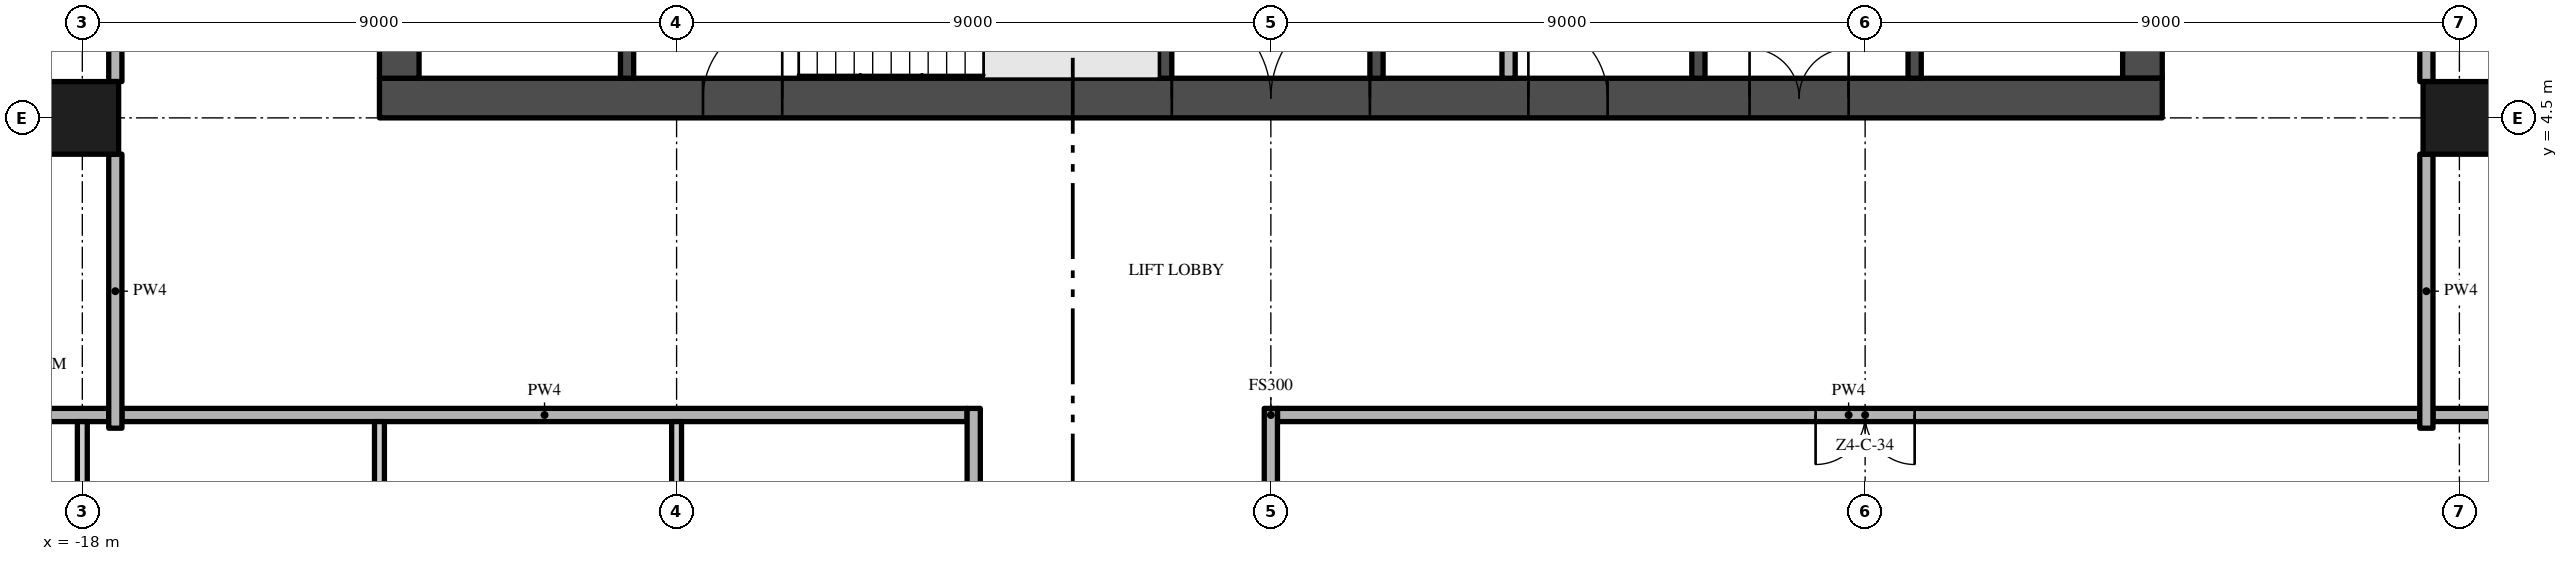
"""IFC4 building model, lengths in metres.
Left out: names, types, materials, properties, quantities, classifications, styles, units other than length and angle.
Written with IfcOpenShell. Run it as: python <this file> out.ifc"""

import sys

from ifc_helpers import new_model, si_unit, direction, frame, frame_2d, origin, origin_2d, place, context, subcontext, project, spatial, rectangle, extrude, element, fill, save


model = new_model("IFC4")
c1 = context("Model", 3, precision=1e-05, world=origin(), true_north=direction((0.0, 1.0)))
c2 = subcontext(c1, "Body", "Model", "MODEL_VIEW")
j1 = project(units=[si_unit("LENGTHUNIT", "METRE"), si_unit("PLANEANGLEUNIT", "RADIAN")], contexts=[c1])
p1 = place(None, origin())
s1 = spatial("IfcSite", under=j1, at=p1, CompositionType="ELEMENT")
p2 = place(p1, origin())
s2 = spatial("IfcBuilding", under=s1, at=p2, CompositionType="ELEMENT")
p3 = place(p2, frame((0.0, 0.0, 207.2)))
s3 = spatial("IfcBuildingStorey", under=s2, at=p3, CompositionType="ELEMENT", Elevation=207.2)
p4 = place(p3, frame((-13.5, 4.8, -0.3), z_axis=(0.0, 0.0, 1.0), x_axis=(1.0, 0.0, 0.0)))
e1 = element("IfcWall", 1, at=p4, inside=s3, PredefinedType="SHEAR", context=c2, shape_type="SweptSolid", body=[
    extrude(rectangle(XDim=27.0, YDim=0.6, at=frame_2d((13.5, 0.0))), origin(), (0.0, 0.0, 1.0), 3.8),
])
p5 = place(p4, frame((12.0, 0.0, 0.3)))
e2 = element("IfcOpeningElement", 2, at=p5, cuts=e1, PredefinedType="OPENING", context=c2, shape_type="SweptSolid", body=[
    extrude(rectangle(XDim=3.0, YDim=2.4, at=frame_2d((1.5, 1.2))), frame((0.0, 0.31, 0.0), z_axis=(0.0, -1.0, 0.0), x_axis=(1.0, 0.0, 0.0)), (0.0, 0.0, 1.0), 0.62),
])
p6 = place(p4, frame((4.9, 0.0, 0.3)))
e3 = element("IfcOpeningElement", 3, at=p6, cuts=e1, PredefinedType="OPENING", context=c2, shape_type="SweptSolid", body=[
    extrude(rectangle(XDim=1.2, YDim=2.2, at=frame_2d((0.6, 1.1))), frame((0.0, 0.31, 0.0), z_axis=(0.0, -1.0, 0.0), x_axis=(1.0, 0.0, 0.0)), (0.0, 0.0, 1.0), 0.62),
])
p7 = place(p4, frame((20.75, 0.0, 0.3)))
e4 = element("IfcOpeningElement", 4, at=p7, cuts=e1, PredefinedType="OPENING", context=c2, shape_type="SweptSolid", body=[
    extrude(rectangle(XDim=1.5, YDim=2.2, at=frame_2d((0.75, 1.1))), frame((0.0, 0.31, 0.0), z_axis=(0.0, -1.0, 0.0), x_axis=(1.0, 0.0, 0.0)), (0.0, 0.0, 1.0), 0.62),
])
p8 = place(p4, frame((17.4, 0.0, 0.3)))
e5 = element("IfcOpeningElement", 5, at=p8, cuts=e1, PredefinedType="OPENING", context=c2, shape_type="SweptSolid", body=[
    extrude(rectangle(XDim=1.2, YDim=2.2, at=frame_2d((0.6, 1.1))), frame((0.0, 0.31, 0.0), z_axis=(0.0, -1.0, 0.0), x_axis=(1.0, 0.0, 0.0)), (0.0, 0.0, 1.0), 0.62),
])
p9 = place(p3, frame((13.2, 5.1, -0.3), z_axis=(0.0, 0.0, 1.0), x_axis=(0.0, 1.0, 0.0)))
e6 = element("IfcWall", 6, at=p9, inside=s3, PredefinedType="SHEAR", context=c2, shape_type="SweptSolid", body=[
    extrude(rectangle(XDim=16.8, YDim=0.6, at=frame_2d((8.4, 0.0))), origin(), (0.0, 0.0, 1.0), 3.8),
])
p10 = place(p9, frame((6.3, 0.0, 0.3)))
e7 = element("IfcOpeningElement", 7, at=p10, cuts=e6, PredefinedType="OPENING", context=c2, shape_type="SweptSolid", body=[
    extrude(rectangle(XDim=1.2, YDim=2.2, at=frame_2d((0.6, 1.1))), frame((0.0, 0.31, 0.0), z_axis=(0.0, -1.0, 0.0), x_axis=(1.0, 0.0, 0.0)), (0.0, 0.0, 1.0), 0.62),
])
p11 = place(p3, frame((-13.2, 21.9, -0.3), z_axis=(0.0, 0.0, 1.0), x_axis=(0.0, -1.0, 0.0)))
e8 = element("IfcWall", 8, at=p11, inside=s3, PredefinedType="SHEAR", context=c2, shape_type="SweptSolid", body=[
    extrude(rectangle(XDim=16.8, YDim=0.6, at=frame_2d((8.4, 0.0))), origin(), (0.0, 0.0, 1.0), 3.8),
])
p12 = place(p11, frame((9.3, 0.0, 0.3)))
e9 = element("IfcOpeningElement", 9, at=p12, cuts=e8, PredefinedType="OPENING", context=c2, shape_type="SweptSolid", body=[
    extrude(rectangle(XDim=1.2, YDim=2.2, at=frame_2d((0.6, 1.1))), frame((0.0, 0.31, 0.0), z_axis=(0.0, -1.0, 0.0), x_axis=(1.0, 0.0, 0.0)), (0.0, 0.0, 1.0), 0.62),
])
for number, where, z_axis, x_axis in (
    (10, (-18.0, 4.5, 0.0), (0.0, 0.0, 1.0), (1.0, 0.0, 0.0)),
    (11, (18.0, 4.5, 0.0), (0.0, 0.0, 1.0), (1.0, 0.0, 0.0)),
):
    element("IfcColumn", number, at=place(p3, frame(where, z_axis=z_axis, x_axis=x_axis)), inside=s3, PredefinedType="COLUMN", context=c2, shape_type="SweptSolid", body=[
        extrude(rectangle(XDim=1.1, YDim=1.1, at=origin_2d()), origin(), (0.0, 0.0, 1.0), 3.5),
    ])
for number, where, z_axis, x_axis in (
    (12, (-9.75, 5.1, 0.0), (0.0, 0.0, 1.0), (0.0, 1.0, 0.0)),
    (13, (-1.6, 5.1, 0.0), (0.0, 0.0, 1.0), (0.0, 1.0, 0.0)),
):
    element("IfcWall", number, at=place(p3, frame(where, z_axis=z_axis, x_axis=x_axis)), inside=s3, PredefinedType="SHEAR", context=c2, shape_type="SweptSolid", body=[
        extrude(rectangle(XDim=2.85, YDim=0.2, at=frame_2d((1.425, 0.0))), origin(), (0.0, 0.0, 1.0), 3.5),
    ])
p13 = place(p3, frame((1.6, 13.5, 0.0), z_axis=(0.0, 0.0, 1.0), x_axis=(0.0, -1.0, 0.0)))
e14 = element("IfcWall", 14, at=p13, inside=s3, PredefinedType="SHEAR", context=c2, shape_type="SweptSolid", body=[
    extrude(rectangle(XDim=8.4, YDim=0.2, at=frame_2d((4.2, 0.0))), origin(), (0.0, 0.0, 1.0), 3.5),
])
p14 = place(p13, frame((3.35, 0.0, 0.0)))
e15 = element("IfcOpeningElement", 15, at=p14, cuts=e14, PredefinedType="OPENING", context=c2, shape_type="SweptSolid", body=[
    extrude(rectangle(XDim=0.9, YDim=2.1, at=frame_2d((0.45, 1.05))), frame((0.0, 0.11, 0.0), z_axis=(0.0, -1.0, 0.0), x_axis=(1.0, 0.0, 0.0)), (0.0, 0.0, 1.0), 0.22),
])
p15 = place(p3, frame((3.6, 13.5, 0.0), z_axis=(0.0, 0.0, 1.0), x_axis=(0.0, -1.0, 0.0)))
e16 = element("IfcWall", 16, at=p15, inside=s3, PredefinedType="PARTITIONING", context=c2, shape_type="SweptSolid", body=[
    extrude(rectangle(XDim=8.4, YDim=0.2, at=frame_2d((4.2, 0.0))), origin(), (0.0, 0.0, 1.0), 3.5),
])
p16 = place(p15, frame((3.75, 0.0, 0.0)))
e17 = element("IfcOpeningElement", 17, at=p16, cuts=e16, PredefinedType="OPENING", context=c2, shape_type="SweptSolid", body=[
    extrude(rectangle(XDim=0.9, YDim=2.1, at=frame_2d((0.45, 1.05))), frame((0.0, 0.11, 0.0), z_axis=(0.0, -1.0, 0.0), x_axis=(1.0, 0.0, 0.0)), (0.0, 0.0, 1.0), 0.22),
])
p17 = place(p3, frame((6.475, 5.1, 0.0), z_axis=(0.0, 0.0, 1.0), x_axis=(0.0, 1.0, 0.0)))
e18 = element("IfcWall", 18, at=p17, inside=s3, PredefinedType="SHEAR", context=c2, shape_type="SweptSolid", body=[
    extrude(rectangle(XDim=7.0, YDim=0.2, at=frame_2d((3.5, 0.0))), origin(), (0.0, 0.0, 1.0), 3.5),
])
p18 = place(p3, frame((9.75, 5.1, 0.0), z_axis=(0.0, 0.0, 1.0), x_axis=(0.0, 1.0, 0.0)))
e19 = element("IfcWall", 19, at=p18, inside=s3, PredefinedType="SHEAR", context=c2, shape_type="SweptSolid", body=[
    extrude(rectangle(XDim=2.5, YDim=0.2, at=frame_2d((1.25, 0.0))), origin(), (0.0, 0.0, 1.0), 3.5),
])
p19 = place(p18, frame((0.85, 0.0, 0.0)))
e20 = element("IfcOpeningElement", 20, at=p19, cuts=e19, PredefinedType="OPENING", context=c2, shape_type="SweptSolid", body=[
    extrude(rectangle(XDim=1.1, YDim=2.1, at=frame_2d((0.55, 1.05))), frame((0.0, 0.11, 0.0), z_axis=(0.0, -1.0, 0.0), x_axis=(1.0, 0.0, 0.0)), (0.0, 0.0, 1.0), 0.22),
])
p20 = place(p3, frame((-17.4, 0.0, 0.0), z_axis=(0.0, 0.0, 1.0), x_axis=(1.0, 0.0, 0.0)))
e21 = element("IfcWall", 21, at=p20, inside=s3, PredefinedType="PARTITIONING", context=c2, shape_type="SweptSolid", body=[
    extrude(rectangle(XDim=12.8, YDim=0.2, at=frame_2d((6.4, 0.0))), origin(), (0.0, 0.0, 1.0), 3.5),
])
p21 = place(p3, frame((17.4, 0.0, 0.0), z_axis=(0.0, 0.0, 1.0), x_axis=(-1.0, 0.0, 0.0)))
e22 = element("IfcWall", 22, at=p21, inside=s3, PredefinedType="PARTITIONING", context=c2, shape_type="SweptSolid", body=[
    extrude(rectangle(XDim=17.3, YDim=0.2, at=frame_2d((8.65, 0.0))), origin(), (0.0, 0.0, 1.0), 3.5),
])
p22 = place(p21, frame((7.65, 0.0, 0.0)))
e23 = element("IfcOpeningElement", 23, at=p22, cuts=e22, PredefinedType="OPENING", context=c2, shape_type="SweptSolid", body=[
    extrude(rectangle(XDim=1.5, YDim=2.4, at=frame_2d((0.75, 1.2))), frame((0.0, 0.11, 0.0), z_axis=(0.0, -1.0, 0.0), x_axis=(1.0, 0.0, 0.0)), (0.0, 0.0, 1.0), 0.22),
])
for number, where, z_axis, x_axis in (
    (24, (-26.7, 0.0, 0.0), (0.0, 0.0, 1.0), (1.0, 0.0, 0.0)),
    (25, (17.6, 0.0, 0.0), (0.0, 0.0, 1.0), (1.0, 0.0, 0.0)),
):
    element("IfcWall", number, at=place(p3, frame(where, z_axis=z_axis, x_axis=x_axis)), inside=s3, PredefinedType="PARTITIONING", context=c2, shape_type="SweptSolid", body=[
        extrude(rectangle(XDim=9.1, YDim=0.2, at=frame_2d((4.55, 0.0))), origin(), (0.0, 0.0, 1.0), 3.5),
    ])
p23 = place(p3, frame((-18.0, -3.95, 0.0), z_axis=(0.0, 0.0, 1.0), x_axis=(0.0, 1.0, 0.0)))
e26 = element("IfcWall", 26, at=p23, inside=s3, PredefinedType="PARTITIONING", context=c2, shape_type="SweptSolid", body=[
    extrude(rectangle(XDim=3.85, YDim=0.15, at=frame_2d((1.925, 0.0))), origin(), (0.0, 0.0, 1.0), 3.5),
])
p24 = place(p23, frame((0.15, 0.0, 0.0)))
e27 = element("IfcOpeningElement", 27, at=p24, cuts=e26, PredefinedType="OPENING", context=c2, shape_type="SweptSolid", body=[
    extrude(rectangle(XDim=1.0, YDim=2.4, at=frame_2d((0.5, 1.2))), frame((0.0, 0.085, 0.0), z_axis=(0.0, -1.0, 0.0), x_axis=(1.0, 0.0, 0.0)), (0.0, 0.0, 1.0), 0.17),
])
p25 = place(p3, frame((-17.5, -0.2, 0.0), z_axis=(0.0, 0.0, 1.0), x_axis=(0.0, 1.0, 0.0)))
e28 = element("IfcWall", 28, at=p25, inside=s3, PredefinedType="PARTITIONING", context=c2, shape_type="SweptSolid", body=[
    extrude(rectangle(XDim=4.15, YDim=0.2, at=frame_2d((2.075, 0.0))), origin(), (0.0, 0.0, 1.0), 3.5),
])
p26 = place(p3, frame((-17.5, 5.05, 0.0), z_axis=(0.0, 0.0, 1.0), x_axis=(0.0, 1.0, 0.0)))
e29 = element("IfcWall", 29, at=p26, inside=s3, PredefinedType="PARTITIONING", context=c2, shape_type="SweptSolid", body=[
    extrude(rectangle(XDim=7.9, YDim=0.2, at=frame_2d((3.95, 0.0))), origin(), (0.0, 0.0, 1.0), 3.5),
])
p27 = place(p3, frame((-13.5, -8.325, 0.0), z_axis=(0.0, 0.0, 1.0), x_axis=(0.0, 1.0, 0.0)))
e30 = element("IfcWall", 30, at=p27, inside=s3, PredefinedType="PARTITIONING", context=c2, shape_type="SweptSolid", body=[
    extrude(rectangle(XDim=8.225, YDim=0.15, at=frame_2d((4.112, 0.0))), origin(), (0.0, 0.0, 1.0), 3.5),
])
p28 = place(p3, frame((-9.0, -3.95, 0.0), z_axis=(0.0, 0.0, 1.0), x_axis=(0.0, 1.0, 0.0)))
e31 = element("IfcWall", 31, at=p28, inside=s3, PredefinedType="PARTITIONING", context=c2, shape_type="SweptSolid", body=[
    extrude(rectangle(XDim=3.85, YDim=0.15, at=frame_2d((1.925, 0.0))), origin(), (0.0, 0.0, 1.0), 3.5),
])
p29 = place(p28, frame((0.45, 0.0, 0.0)))
e32 = element("IfcOpeningElement", 32, at=p29, cuts=e31, PredefinedType="OPENING", context=c2, shape_type="SweptSolid", body=[
    extrude(rectangle(XDim=1.0, YDim=2.4, at=frame_2d((0.5, 1.2))), frame((0.0, 0.085, 0.0), z_axis=(0.0, -1.0, 0.0), x_axis=(1.0, 0.0, 0.0)), (0.0, 0.0, 1.0), 0.17),
])
p30 = place(p3, frame((-4.5, -22.2, 0.0), z_axis=(0.0, 0.0, 1.0), x_axis=(0.0, 1.0, 0.0)))
e33 = element("IfcWall", 33, at=p30, inside=s3, PredefinedType="PARTITIONING", context=c2, shape_type="SweptSolid", body=[
    extrude(rectangle(XDim=22.3, YDim=0.2, at=frame_2d((11.15, 0.0))), origin(), (0.0, 0.0, 1.0), 3.5),
])
p31 = place(p30, frame((10.2, 0.0, 0.0)))
e34 = element("IfcOpeningElement", 34, at=p31, cuts=e33, PredefinedType="OPENING", context=c2, shape_type="SweptSolid", body=[
    extrude(rectangle(XDim=1.5, YDim=2.4, at=frame_2d((0.75, 1.2))), frame((0.0, 0.11, 0.0), z_axis=(0.0, -1.0, 0.0), x_axis=(1.0, 0.0, 0.0)), (0.0, 0.0, 1.0), 0.22),
])
p32 = place(p3, frame((0.0, -3.95, 0.0), z_axis=(0.0, 0.0, 1.0), x_axis=(0.0, 1.0, 0.0)))
e35 = element("IfcWall", 35, at=p32, inside=s3, PredefinedType="PARTITIONING", context=c2, shape_type="SweptSolid", body=[
    extrude(rectangle(XDim=4.05, YDim=0.2, at=frame_2d((2.025, 0.0))), origin(), (0.0, 0.0, 1.0), 3.5),
])
p33 = place(p3, frame((17.5, -0.2, 0.0), z_axis=(0.0, 0.0, 1.0), x_axis=(0.0, 1.0, 0.0)))
e36 = element("IfcWall", 36, at=p33, inside=s3, PredefinedType="PARTITIONING", context=c2, shape_type="SweptSolid", body=[
    extrude(rectangle(XDim=4.15, YDim=0.2, at=frame_2d((2.075, 0.0))), origin(), (0.0, 0.0, 1.0), 3.5),
])
p34 = place(p3, frame((17.5, 5.05, 0.0), z_axis=(0.0, 0.0, 1.0), x_axis=(0.0, 1.0, 0.0)))
e37 = element("IfcWall", 37, at=p34, inside=s3, PredefinedType="PARTITIONING", context=c2, shape_type="SweptSolid", body=[
    extrude(rectangle(XDim=7.9, YDim=0.2, at=frame_2d((3.95, 0.0))), origin(), (0.0, 0.0, 1.0), 3.5),
])
p35 = place(p5, frame((3.0, 0.0, 0.0), z_axis=(0.0, 0.0, 1.0), x_axis=(-1.0, 0.0, 0.0)))
e38 = element("IfcDoor", 38, at=p35, inside=s3, OperationType="DOUBLE_DOOR_SINGLE_SWING", PredefinedType="DOOR", context=c2, shape_type="SweptSolid", body=[
    extrude(rectangle(XDim=3.0, YDim=2.4, at=frame_2d((1.5, 1.2))), frame((0.0, 0.025, 0.0), z_axis=(0.0, -1.0, 0.0), x_axis=(1.0, 0.0, 0.0)), (0.0, 0.0, 1.0), 0.05),
])
fill(e2, e38)
p36 = place(p6, frame((1.2, 0.0, 0.0), z_axis=(0.0, 0.0, 1.0), x_axis=(-1.0, 0.0, 0.0)))
e39 = element("IfcDoor", 39, at=p36, inside=s3, OperationType="SINGLE_SWING_LEFT", PredefinedType="DOOR", context=c2, shape_type="SweptSolid", body=[
    extrude(rectangle(XDim=1.2, YDim=2.2, at=frame_2d((0.6, 1.1))), frame((0.0, 0.025, 0.0), z_axis=(0.0, -1.0, 0.0), x_axis=(1.0, 0.0, 0.0)), (0.0, 0.0, 1.0), 0.05),
])
fill(e3, e39)
p37 = place(p7, frame((1.5, 0.0, 0.0), z_axis=(0.0, 0.0, 1.0), x_axis=(-1.0, 0.0, 0.0)))
e40 = element("IfcDoor", 40, at=p37, inside=s3, OperationType="DOUBLE_DOOR_SINGLE_SWING", PredefinedType="DOOR", context=c2, shape_type="SweptSolid", body=[
    extrude(rectangle(XDim=1.5, YDim=2.2, at=frame_2d((0.75, 1.1))), frame((0.0, 0.025, 0.0), z_axis=(0.0, -1.0, 0.0), x_axis=(1.0, 0.0, 0.0)), (0.0, 0.0, 1.0), 0.05),
])
fill(e4, e40)
p38 = place(p8, frame((1.2, 0.0, 0.0), z_axis=(0.0, 0.0, 1.0), x_axis=(-1.0, 0.0, 0.0)))
e41 = element("IfcDoor", 41, at=p38, inside=s3, OperationType="SINGLE_SWING_RIGHT", PredefinedType="DOOR", context=c2, shape_type="SweptSolid", body=[
    extrude(rectangle(XDim=1.2, YDim=2.2, at=frame_2d((0.6, 1.1))), frame((0.0, 0.025, 0.0), z_axis=(0.0, -1.0, 0.0), x_axis=(1.0, 0.0, 0.0)), (0.0, 0.0, 1.0), 0.05),
])
fill(e5, e41)
p39 = place(p22, origin())
e42 = element("IfcDoor", 42, at=p39, inside=s3, OperationType="DOUBLE_DOOR_SINGLE_SWING", PredefinedType="DOOR", context=c2, shape_type="SweptSolid", body=[
    extrude(rectangle(XDim=1.5, YDim=2.4, at=frame_2d((0.75, 1.2))), frame((0.0, 0.025, 0.0), z_axis=(0.0, -1.0, 0.0), x_axis=(1.0, 0.0, 0.0)), (0.0, 0.0, 1.0), 0.05),
])
fill(e23, e42)
save(model, sys.argv[1])
